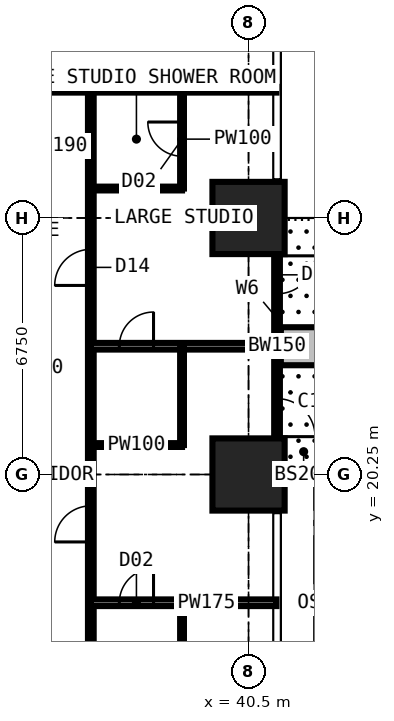
"""IFC4 building model, lengths in metres.
Left out: names, types, materials, properties, quantities, classifications, styles, units other than length and angle.
Written with IfcOpenShell. Run it as: python <this file> out.ifc"""

import sys

from ifc_helpers import new_model, si_unit, direction, frame, frame_2d, origin, origin_2d, place, context, subcontext, project, spatial, rectangle, extrude, element, fill, save


model = new_model("IFC4")
c1 = context("Model", 3, precision=1e-05, world=origin(), true_north=direction((0.0, 1.0)))
c2 = subcontext(c1, "Body", "Model", "MODEL_VIEW")
j1 = project(units=[si_unit("LENGTHUNIT", "METRE"), si_unit("PLANEANGLEUNIT", "RADIAN")], contexts=[c1])
p1 = place(None, origin())
s1 = spatial("IfcSite", under=j1, at=p1, CompositionType="ELEMENT")
p2 = place(p1, origin())
s2 = spatial("IfcBuilding", under=s1, at=p2, CompositionType="ELEMENT")
p3 = place(p2, frame((0.0, 0.0, 21.6)))
s3 = spatial("IfcBuildingStorey", under=s2, at=p3, CompositionType="ELEMENT", Elevation=21.6)
for number, where, z_axis, x_axis in (
    (1, (40.5, 20.25, 0.0), (0.0, 0.0, 1.0), (1.0, 0.0, 0.0)),
    (2, (40.5, 27.0, 0.0), (0.0, 0.0, 1.0), (1.0, 0.0, 0.0)),
):
    element("IfcColumn", number, at=place(p3, frame(where, z_axis=z_axis, x_axis=x_axis)), inside=s3, PredefinedType="COLUMN", context=c2, shape_type="SweptSolid", body=[
        extrude(rectangle(XDim=1.9, YDim=1.9, at=origin_2d()), origin(), (0.0, 0.0, 1.0), 3.6),
    ])
p4 = place(p3, frame((41.25, 27.0, 0.0), z_axis=(0.0, 0.0, 1.0), x_axis=(0.0, -1.0, 0.0)))
e3 = element("IfcWall", 3, at=p4, inside=s3, PredefinedType="SOLIDWALL", context=c2, shape_type="SweptSolid", body=[
    extrude(rectangle(XDim=6.75, YDim=0.15, at=frame_2d((3.375, 0.0))), origin(), (0.0, 0.0, 1.0), 3.375),
])
p5 = place(p4, frame((0.996, 0.0, 0.0)))
e4 = element("IfcOpeningElement", 4, at=p5, cuts=e3, PredefinedType="OPENING", context=c2, shape_type="SweptSolid", body=[
    extrude(rectangle(XDim=1.0, YDim=2.2, at=frame_2d((0.5, 1.1))), frame((0.0, 0.085, 0.0), z_axis=(0.0, -1.0, 0.0), x_axis=(1.0, 0.0, 0.0)), (0.0, 0.0, 1.0), 0.17),
])
p6 = place(p4, frame((2.042, 0.0, 0.9)))
e5 = element("IfcOpeningElement", 5, at=p6, cuts=e3, PredefinedType="OPENING", context=c2, shape_type="SweptSolid", body=[
    extrude(rectangle(XDim=1.2, YDim=1.8, at=frame_2d((0.6, 0.9))), frame((0.0, 0.085, 0.0), z_axis=(0.0, -1.0, 0.0), x_axis=(1.0, 0.0, 0.0)), (0.0, 0.0, 1.0), 0.17),
])
p7 = place(p4, frame((4.754, 0.0, 0.0)))
e6 = element("IfcOpeningElement", 6, at=p7, cuts=e3, PredefinedType="OPENING", context=c2, shape_type="SweptSolid", body=[
    extrude(rectangle(XDim=1.0, YDim=2.2, at=frame_2d((0.5, 1.1))), frame((0.0, 0.085, 0.0), z_axis=(0.0, -1.0, 0.0), x_axis=(1.0, 0.0, 0.0)), (0.0, 0.0, 1.0), 0.17),
])
p8 = place(p4, frame((3.508, 0.0, 0.9)))
e7 = element("IfcOpeningElement", 7, at=p8, cuts=e3, PredefinedType="OPENING", context=c2, shape_type="SweptSolid", body=[
    extrude(rectangle(XDim=1.2, YDim=1.8, at=frame_2d((0.6, 0.9))), frame((0.0, 0.085, 0.0), z_axis=(0.0, -1.0, 0.0), x_axis=(1.0, 0.0, 0.0)), (0.0, 0.0, 1.0), 0.17),
])
p9 = place(p3, frame((41.35, 23.625, 0.0), z_axis=(0.0, 0.0, 1.0), x_axis=(1.0, 0.0, 0.0)))
e8 = element("IfcWall", 8, at=p9, inside=s3, PredefinedType="USERDEFINED", context=c2, shape_type="SweptSolid", body=[
    extrude(rectangle(XDim=2.2, YDim=1.0, at=frame_2d((1.1, 0.0))), origin(), (0.0, 0.0, 1.0), 0.9),
])
p10 = place(p3, frame((30.375, 30.375, 0.0), z_axis=(0.0, 0.0, 1.0), x_axis=(1.0, 0.0, 0.0)))
e9 = element("IfcWall", 9, at=p10, inside=s3, PredefinedType="PARTITIONING", context=c2, shape_type="SweptSolid", body=[
    extrude(rectangle(XDim=10.859, YDim=0.15, at=frame_2d((5.429, 0.0))), origin(), (0.0, 0.0, 1.0), 3.375),
])
p11 = place(p3, frame((36.35, 6.75, 0.0), z_axis=(0.0, 0.0, 1.0), x_axis=(0.0, 1.0, 0.0)))
e10 = element("IfcWall", 10, at=p11, inside=s3, PredefinedType="PARTITIONING", context=c2, shape_type="SweptSolid", body=[
    extrude(rectangle(XDim=23.625, YDim=0.15, at=frame_2d((11.812, 0.0))), origin(), (0.0, 0.0, 1.0), 3.375),
])
p12 = place(p11, frame((0.2, 0.0, 0.0)))
e11 = element("IfcOpeningElement", 11, at=p12, cuts=e10, PredefinedType="OPENING", context=c2, shape_type="SweptSolid", body=[
    extrude(rectangle(XDim=0.95, YDim=2.2, at=frame_2d((0.475, 1.1))), frame((0.0, 0.085, 0.0), z_axis=(0.0, -1.0, 0.0), x_axis=(1.0, 0.0, 0.0)), (0.0, 0.0, 1.0), 0.17),
])
p13 = place(p11, frame((18.475, 0.0, 0.0)))
e12 = element("IfcOpeningElement", 12, at=p13, cuts=e10, PredefinedType="OPENING", context=c2, shape_type="SweptSolid", body=[
    extrude(rectangle(XDim=0.95, YDim=2.2, at=frame_2d((0.475, 1.1))), frame((0.0, 0.085, 0.0), z_axis=(0.0, -1.0, 0.0), x_axis=(1.0, 0.0, 0.0)), (0.0, 0.0, 1.0), 0.17),
])
p14 = place(p11, frame((11.725, 0.0, 0.0)))
e13 = element("IfcOpeningElement", 13, at=p14, cuts=e10, PredefinedType="OPENING", context=c2, shape_type="SweptSolid", body=[
    extrude(rectangle(XDim=0.95, YDim=2.2, at=frame_2d((0.475, 1.1))), frame((0.0, 0.085, 0.0), z_axis=(0.0, -1.0, 0.0), x_axis=(1.0, 0.0, 0.0)), (0.0, 0.0, 1.0), 0.17),
])
p15 = place(p11, frame((4.975, 0.0, 0.0)))
e14 = element("IfcOpeningElement", 14, at=p15, cuts=e10, PredefinedType="OPENING", context=c2, shape_type="SweptSolid", body=[
    extrude(rectangle(XDim=0.95, YDim=2.2, at=frame_2d((0.475, 1.1))), frame((0.0, 0.085, 0.0), z_axis=(0.0, -1.0, 0.0), x_axis=(1.0, 0.0, 0.0)), (0.0, 0.0, 1.0), 0.17),
])
p16 = place(p3, frame((36.35, 16.875, 0.0), z_axis=(0.0, 0.0, 1.0), x_axis=(1.0, 0.0, 0.0)))
e15 = element("IfcWall", 15, at=p16, inside=s3, PredefinedType="PARTITIONING", context=c2, shape_type="SweptSolid", body=[
    extrude(rectangle(XDim=4.884, YDim=0.175, at=frame_2d((2.442, 0.0))), origin(), (0.0, 0.0, 1.0), 3.375),
])
p17 = place(p16, frame((0.75, 0.0, 0.0)))
e16 = element("IfcOpeningElement", 16, at=p17, cuts=e15, PredefinedType="OPENING", context=c2, shape_type="SweptSolid", body=[
    extrude(rectangle(XDim=0.9, YDim=2.2, at=frame_2d((0.45, 1.1))), frame((0.0, 0.097, 0.0), z_axis=(0.0, -1.0, 0.0), x_axis=(1.0, 0.0, 0.0)), (0.0, 0.0, 1.0), 0.195),
])
p18 = place(p3, frame((36.35, 21.025, 0.0), z_axis=(0.0, 0.0, 1.0), x_axis=(1.0, 0.0, 0.0)))
e17 = element("IfcWall", 17, at=p18, inside=s3, PredefinedType="PARTITIONING", context=c2, shape_type="SweptSolid", body=[
    extrude(rectangle(XDim=2.4, YDim=0.1, at=frame_2d((1.2, 0.0))), origin(), (0.0, 0.0, 1.0), 3.375),
])
p19 = place(p3, frame((36.35, 23.625, 0.0), z_axis=(0.0, 0.0, 1.0), x_axis=(1.0, 0.0, 0.0)))
e18 = element("IfcWall", 18, at=p19, inside=s3, PredefinedType="PARTITIONING", context=c2, shape_type="SweptSolid", body=[
    extrude(rectangle(XDim=4.884, YDim=0.175, at=frame_2d((2.442, 0.0))), origin(), (0.0, 0.0, 1.0), 3.375),
])
p20 = place(p19, frame((0.75, 0.0, 0.0)))
e19 = element("IfcOpeningElement", 19, at=p20, cuts=e18, PredefinedType="OPENING", context=c2, shape_type="SweptSolid", body=[
    extrude(rectangle(XDim=0.9, YDim=2.2, at=frame_2d((0.45, 1.1))), frame((0.0, 0.097, 0.0), z_axis=(0.0, -1.0, 0.0), x_axis=(1.0, 0.0, 0.0)), (0.0, 0.0, 1.0), 0.195),
])
p21 = place(p3, frame((36.35, 27.775, 0.0), z_axis=(0.0, 0.0, 1.0), x_axis=(1.0, 0.0, 0.0)))
e20 = element("IfcWall", 20, at=p21, inside=s3, PredefinedType="PARTITIONING", context=c2, shape_type="SweptSolid", body=[
    extrude(rectangle(XDim=2.4, YDim=0.1, at=frame_2d((1.2, 0.0))), origin(), (0.0, 0.0, 1.0), 3.375),
])
for number, where, z_axis, x_axis in (
    (21, (38.75, 14.275, 0.0), (0.0, 0.0, 1.0), (0.0, 1.0, 0.0)),
    (22, (38.75, 21.025, 0.0), (0.0, 0.0, 1.0), (0.0, 1.0, 0.0)),
):
    element("IfcWall", number, at=place(p3, frame(where, z_axis=z_axis, x_axis=x_axis)), inside=s3, PredefinedType="PARTITIONING", context=c2, shape_type="SweptSolid", body=[
        extrude(rectangle(XDim=2.6, YDim=0.1, at=frame_2d((1.3, 0.0))), origin(), (0.0, 0.0, 1.0), 3.375),
    ])
p22 = place(p3, frame((38.75, 27.775, 0.0), z_axis=(0.0, 0.0, 1.0), x_axis=(0.0, 1.0, 0.0)))
e23 = element("IfcWall", 23, at=p22, inside=s3, PredefinedType="PARTITIONING", context=c2, shape_type="SweptSolid", body=[
    extrude(rectangle(XDim=2.6, YDim=0.1, at=frame_2d((1.3, 0.0))), origin(), (0.0, 0.0, 1.0), 3.375),
])
p23 = place(p22, frame((0.85, 0.0, 0.0)))
e24 = element("IfcOpeningElement", 24, at=p23, cuts=e23, PredefinedType="OPENING", context=c2, shape_type="SweptSolid", body=[
    extrude(rectangle(XDim=0.9, YDim=2.2, at=frame_2d((0.45, 1.1))), frame((0.0, 0.06, 0.0), z_axis=(0.0, -1.0, 0.0), x_axis=(1.0, 0.0, 0.0)), (0.0, 0.0, 1.0), 0.12),
])
p24 = place(p5, origin())
e25 = element("IfcDoor", 25, at=p24, inside=s3, OperationType="SINGLE_SWING_LEFT", PredefinedType="DOOR", context=c2, shape_type="SweptSolid", body=[
    extrude(rectangle(XDim=1.0, YDim=2.2, at=frame_2d((0.5, 1.1))), frame((0.0, 0.025, 0.0), z_axis=(0.0, -1.0, 0.0), x_axis=(1.0, 0.0, 0.0)), (0.0, 0.0, 1.0), 0.05),
])
fill(e4, e25)
p25 = place(p6, origin())
e26 = element("IfcWindow", 26, at=p25, inside=s3, PartitioningType="SINGLE_PANEL", PredefinedType="WINDOW", context=c2, shape_type="SweptSolid", body=[
    extrude(rectangle(XDim=1.2, YDim=1.8, at=frame_2d((0.6, 0.9))), frame((0.0, 0.03, 0.0), z_axis=(0.0, -1.0, 0.0), x_axis=(1.0, 0.0, 0.0)), (0.0, 0.0, 1.0), 0.06),
])
fill(e5, e26)
p26 = place(p7, origin())
e27 = element("IfcDoor", 27, at=p26, inside=s3, OperationType="SINGLE_SWING_RIGHT", PredefinedType="DOOR", context=c2, shape_type="SweptSolid", body=[
    extrude(rectangle(XDim=1.0, YDim=2.2, at=frame_2d((0.5, 1.1))), frame((0.0, 0.025, 0.0), z_axis=(0.0, -1.0, 0.0), x_axis=(1.0, 0.0, 0.0)), (0.0, 0.0, 1.0), 0.05),
])
fill(e6, e27)
p27 = place(p8, origin())
e28 = element("IfcWindow", 28, at=p27, inside=s3, PartitioningType="SINGLE_PANEL", PredefinedType="WINDOW", context=c2, shape_type="SweptSolid", body=[
    extrude(rectangle(XDim=1.2, YDim=1.8, at=frame_2d((0.6, 0.9))), frame((0.0, 0.03, 0.0), z_axis=(0.0, -1.0, 0.0), x_axis=(1.0, 0.0, 0.0)), (0.0, 0.0, 1.0), 0.06),
])
fill(e7, e28)
p28 = place(p13, origin())
e29 = element("IfcDoor", 29, at=p28, inside=s3, OperationType="SINGLE_SWING_LEFT", PredefinedType="DOOR", context=c2, shape_type="SweptSolid", body=[
    extrude(rectangle(XDim=0.95, YDim=2.2, at=frame_2d((0.475, 1.1))), frame((0.0, 0.025, 0.0), z_axis=(0.0, -1.0, 0.0), x_axis=(1.0, 0.0, 0.0)), (0.0, 0.0, 1.0), 0.05),
])
fill(e12, e29)
p29 = place(p23, origin())
e30 = element("IfcDoor", 30, at=p29, inside=s3, OperationType="SINGLE_SWING_RIGHT", PredefinedType="DOOR", context=c2, shape_type="SweptSolid", body=[
    extrude(rectangle(XDim=0.9, YDim=2.2, at=frame_2d((0.45, 1.1))), frame((0.0, 0.025, 0.0), z_axis=(0.0, -1.0, 0.0), x_axis=(1.0, 0.0, 0.0)), (0.0, 0.0, 1.0), 0.05),
])
fill(e24, e30)
p30 = place(p14, origin())
e31 = element("IfcDoor", 31, at=p30, inside=s3, OperationType="SINGLE_SWING_LEFT", PredefinedType="DOOR", context=c2, shape_type="SweptSolid", body=[
    extrude(rectangle(XDim=0.95, YDim=2.2, at=frame_2d((0.475, 1.1))), frame((0.0, 0.025, 0.0), z_axis=(0.0, -1.0, 0.0), x_axis=(1.0, 0.0, 0.0)), (0.0, 0.0, 1.0), 0.05),
])
fill(e13, e31)
p31 = place(p20, origin())
e32 = element("IfcDoor", 32, at=p31, inside=s3, OperationType="SINGLE_SWING_RIGHT", PredefinedType="DOOR", context=c2, shape_type="SweptSolid", body=[
    extrude(rectangle(XDim=0.9, YDim=2.2, at=frame_2d((0.45, 1.1))), frame((0.0, 0.025, 0.0), z_axis=(0.0, -1.0, 0.0), x_axis=(1.0, 0.0, 0.0)), (0.0, 0.0, 1.0), 0.05),
])
fill(e19, e32)
p32 = place(p17, origin())
e33 = element("IfcDoor", 33, at=p32, inside=s3, OperationType="SINGLE_SWING_RIGHT", PredefinedType="DOOR", context=c2, shape_type="SweptSolid", body=[
    extrude(rectangle(XDim=0.9, YDim=2.2, at=frame_2d((0.45, 1.1))), frame((0.0, 0.025, 0.0), z_axis=(0.0, -1.0, 0.0), x_axis=(1.0, 0.0, 0.0)), (0.0, 0.0, 1.0), 0.05),
])
fill(e16, e33)
save(model, sys.argv[1])
